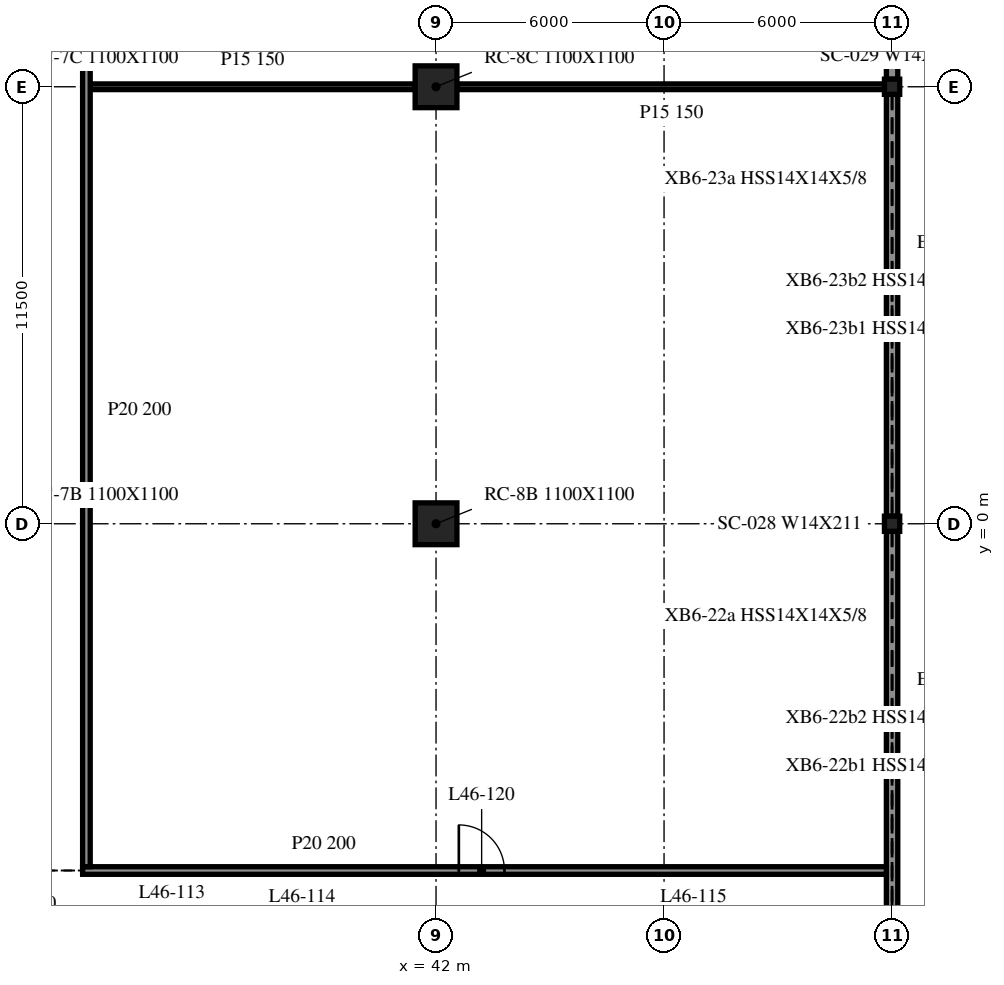
"""IFC4 building model, lengths in metres.
Left out: names, types, materials, properties, quantities, classifications, styles, units other than length and angle.
Written with IfcOpenShell. Run it as: python <this file> out.ifc"""

import sys

from ifc_helpers import new_model, si_unit, direction, frame, frame_2d, origin, origin_2d, place, context, subcontext, project, spatial, rectangle, i_section, extrude, element, fill, save


model = new_model("IFC4")
c1 = context("Model", 3, precision=1e-05, world=origin(), true_north=direction((0.0, 1.0)))
c2 = subcontext(c1, "Body", "Model", "MODEL_VIEW")
j1 = project(units=[si_unit("LENGTHUNIT", "METRE"), si_unit("PLANEANGLEUNIT", "RADIAN")], contexts=[c1])
p1 = place(None, origin())
s1 = spatial("IfcSite", under=j1, at=p1, CompositionType="ELEMENT")
p2 = place(p1, origin())
s2 = spatial("IfcBuilding", under=s1, at=p2, CompositionType="ELEMENT")
p3 = place(p2, frame((0.0, 0.0, 193.9)))
s3 = spatial("IfcBuildingStorey", under=s2, at=p3, CompositionType="ELEMENT", Elevation=193.9)
for number, where, z_axis, x_axis in (
    (1, (42.0, 0.0, -0.34), (0.0, 0.0, 1.0), (1.0, 0.0, 0.0)),
    (2, (42.0, 11.5, -0.34), (0.0, 0.0, 1.0), (1.0, 0.0, 0.0)),
):
    element("IfcColumn", number, at=place(p3, frame(where, z_axis=z_axis, x_axis=x_axis)), inside=s3, PredefinedType="COLUMN", context=c2, shape_type="SweptSolid", body=[
        extrude(rectangle(XDim=1.1, YDim=1.1, at=origin_2d()), origin(), (0.0, 0.0, 1.0), 3.8),
    ])
for number, where, z_axis, x_axis in (
    (3, (54.0, 0.0, -0.34), (0.0, 0.0, 1.0), (1.0, 0.0, 0.0)),
    (4, (54.0, 11.5, -0.34), (0.0, 0.0, 1.0), (1.0, 0.0, 0.0)),
):
    element("IfcColumn", number, at=place(p3, frame(where, z_axis=z_axis, x_axis=x_axis)), inside=s3, PredefinedType="COLUMN", context=c2, shape_type="SweptSolid", body=[
        extrude(i_section(OverallWidth=0.401, OverallDepth=0.399, WebThickness=0.025, FlangeThickness=0.04, at=origin_2d()), origin(), (0.0, 0.0, 1.0), 3.8),
    ])
for number, where, z_axis, x_axis in (
    (5, (54.0, -11.3, 0.0), (0.0, 0.0, 1.0), (0.0, 1.0, 0.0)),
    (6, (54.0, 0.2, 0.0), (0.0, 0.0, 1.0), (0.0, 1.0, 0.0)),
):
    element("IfcWall", number, at=place(p3, frame(where, z_axis=z_axis, x_axis=x_axis)), inside=s3, PredefinedType="NOTDEFINED", context=c2, shape_type="SweptSolid", body=[
        extrude(rectangle(XDim=11.1, YDim=0.3, at=frame_2d((5.55, 0.0))), origin(), (0.0, 0.0, 1.0), 2.782),
    ])
p4 = place(p3, frame((54.0, 11.7, 0.0), z_axis=(0.0, 0.0, 1.0), x_axis=(0.0, 1.0, 0.0)))
e7 = element("IfcWall", 7, at=p4, inside=s3, PredefinedType="NOTDEFINED", context=c2, shape_type="SweptSolid", body=[
    extrude(rectangle(XDim=5.3, YDim=0.3, at=frame_2d((2.65, 0.0))), origin(), (0.0, 0.0, 1.0), 2.782),
])
p5 = place(p3, frame((32.7, -9.125, 0.0), z_axis=(0.0, 0.0, 1.0), x_axis=(1.0, 0.0, 0.0)))
e8 = element("IfcWall", 8, at=p5, inside=s3, PredefinedType="PARTITIONING", context=c2, shape_type="SweptSolid", body=[
    extrude(rectangle(XDim=21.15, YDim=0.2, at=frame_2d((10.575, 0.0))), origin(), (0.0, 0.0, 1.0), 3.46),
])
p6 = place(p5, frame((9.9, 0.0, 0.0)))
e9 = element("IfcOpeningElement", 9, at=p6, cuts=e8, PredefinedType="OPENING", context=c2, shape_type="SweptSolid", body=[
    extrude(rectangle(XDim=1.2, YDim=2.1, at=frame_2d((0.6, 1.05))), frame((0.0, 0.11, 0.0), z_axis=(0.0, -1.0, 0.0), x_axis=(1.0, 0.0, 0.0)), (0.0, 0.0, 1.0), 0.22),
])
p7 = place(p3, frame((32.9, 11.5, 0.0), z_axis=(0.0, 0.0, 1.0), x_axis=(1.0, 0.0, 0.0)))
e10 = element("IfcWall", 10, at=p7, inside=s3, PredefinedType="PARTITIONING", context=c2, shape_type="SweptSolid", body=[
    extrude(rectangle(XDim=8.55, YDim=0.15, at=frame_2d((4.275, 0.0))), origin(), (0.0, 0.0, 1.0), 3.46),
])
p8 = place(p3, frame((42.55, 11.5, 0.0), z_axis=(0.0, 0.0, 1.0), x_axis=(1.0, 0.0, 0.0)))
e11 = element("IfcWall", 11, at=p8, inside=s3, PredefinedType="PARTITIONING", context=c2, shape_type="SweptSolid", body=[
    extrude(rectangle(XDim=11.3, YDim=0.15, at=frame_2d((5.65, 0.0))), origin(), (0.0, 0.0, 1.0), 3.46),
])
p9 = place(p3, frame((32.8, -9.025, 0.0), z_axis=(0.0, 0.0, 1.0), x_axis=(0.0, 1.0, 0.0)))
e12 = element("IfcWall", 12, at=p9, inside=s3, PredefinedType="PARTITIONING", context=c2, shape_type="SweptSolid", body=[
    extrude(rectangle(XDim=24.05, YDim=0.2, at=frame_2d((12.025, 0.0))), origin(), (0.0, 0.0, 1.0), 3.46),
])
p10 = place(p6, origin())
e13 = element("IfcDoor", 13, at=p10, inside=s3, OperationType="SINGLE_SWING_LEFT", PredefinedType="DOOR", context=c2, shape_type="SweptSolid", body=[
    extrude(rectangle(XDim=1.2, YDim=2.1, at=frame_2d((0.6, 1.05))), frame((0.0, 0.025, 0.0), z_axis=(0.0, -1.0, 0.0), x_axis=(1.0, 0.0, 0.0)), (0.0, 0.0, 1.0), 0.05),
])
fill(e9, e13)
save(model, sys.argv[1])
